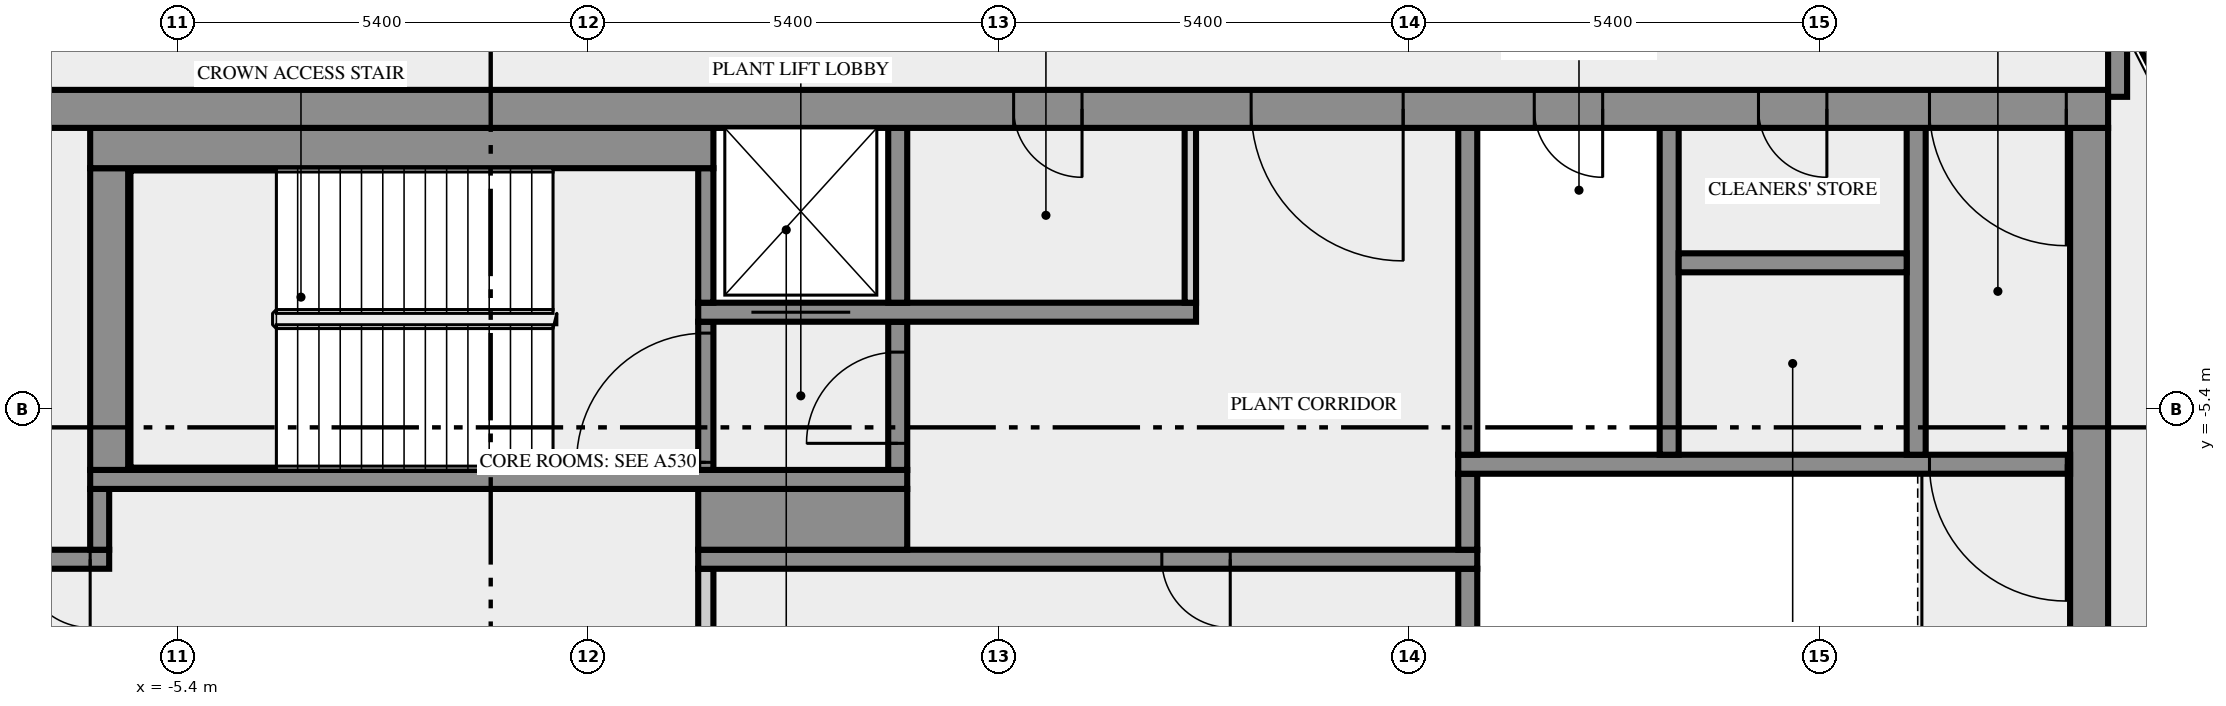
"""IFC4 building model, lengths in metres.
Left out: names, types, materials, properties, quantities, classifications, styles, units other than length and angle.
Written with IfcOpenShell. Run it as: python <this file> out.ifc"""

import sys

from ifc_helpers import new_model, si_unit, direction, frame, frame_2d, origin, place, context, subcontext, project, spatial, rectangle, extrude, element, fill, save


model = new_model("IFC4")
c1 = context("Model", 3, precision=1e-05, world=origin(), true_north=direction((0.0, 1.0)))
c2 = subcontext(c1, "Body", "Model", "MODEL_VIEW")
j1 = project(units=[si_unit("LENGTHUNIT", "METRE"), si_unit("PLANEANGLEUNIT", "RADIAN")], contexts=[c1])
p1 = place(None, origin())
s1 = spatial("IfcSite", under=j1, at=p1, CompositionType="ELEMENT")
p2 = place(p1, origin())
s2 = spatial("IfcBuilding", under=s1, at=p2, CompositionType="ELEMENT")
p3 = place(p2, frame((0.0, 0.0, 363.0)))
s3 = spatial("IfcBuildingStorey", under=s2, at=p3, CompositionType="ELEMENT", Elevation=363.0)
p4 = place(p3, frame((24.274, -7.992, 0.0), z_axis=(0.0, 0.0, 1.0), x_axis=(-0.453998845176, 0.891002271927, 0.0)))
e1 = element("IfcWall", 1, at=p4, inside=s3, PredefinedType="SOLIDWALL", context=c2, shape_type="SweptSolid", body=[
    extrude(rectangle(XDim=20.973, YDim=0.2, at=frame_2d((10.487, 0.0))), origin(), (0.0, 0.0, 1.0), 4.75),
])
p5 = place(p4, frame((0.81, 0.0, 1.0)))
e2 = element("IfcOpeningElement", 2, at=p5, cuts=e1, PredefinedType="OPENING", context=c2, shape_type="SweptSolid", body=[
    extrude(rectangle(XDim=3.0, YDim=2.8, at=frame_2d((1.5, 1.4))), frame((0.0, 0.11, 0.0), z_axis=(0.0, -1.0, 0.0), x_axis=(1.0, 0.0, 0.0)), (0.0, 0.0, 1.0), 0.22),
])
p6 = place(p4, frame((5.928, 0.0, 1.0)))
e3 = element("IfcOpeningElement", 3, at=p6, cuts=e1, PredefinedType="OPENING", context=c2, shape_type="SweptSolid", body=[
    extrude(rectangle(XDim=3.0, YDim=2.8, at=frame_2d((1.5, 1.4))), frame((0.0, 0.11, 0.0), z_axis=(0.0, -1.0, 0.0), x_axis=(1.0, 0.0, 0.0)), (0.0, 0.0, 1.0), 0.22),
])
p7 = place(p4, frame((11.544, 0.0, 1.0)))
e4 = element("IfcOpeningElement", 4, at=p7, cuts=e1, PredefinedType="OPENING", context=c2, shape_type="SweptSolid", body=[
    extrude(rectangle(XDim=3.0, YDim=2.8, at=frame_2d((1.5, 1.4))), frame((0.0, 0.11, 0.0), z_axis=(0.0, -1.0, 0.0), x_axis=(1.0, 0.0, 0.0)), (0.0, 0.0, 1.0), 0.22),
])
p8 = place(p4, frame((16.913, 0.0, 1.0)))
e5 = element("IfcOpeningElement", 5, at=p8, cuts=e1, PredefinedType="OPENING", context=c2, shape_type="SweptSolid", body=[
    extrude(rectangle(XDim=3.0, YDim=2.8, at=frame_2d((1.5, 1.4))), frame((0.0, 0.11, 0.0), z_axis=(0.0, -1.0, 0.0), x_axis=(1.0, 0.0, 0.0)), (0.0, 0.0, 1.0), 0.22),
])
p9 = place(p3, frame((1.55, -10.5, 0.0), z_axis=(0.0, 0.0, 1.0), x_axis=(0.0, 1.0, 0.0)))
e6 = element("IfcWall", 6, at=p9, inside=s3, PredefinedType="SOLIDWALL", context=c2, shape_type="SweptSolid", body=[
    extrude(rectangle(XDim=3.0, YDim=0.2, at=frame_2d((1.5, 0.0))), origin(), (0.0, 0.0, 1.0), 4.75),
])
p10 = place(p3, frame((11.575, -10.5, 0.0), z_axis=(0.0, 0.0, 1.0), x_axis=(0.0, 1.0, 0.0)))
e7 = element("IfcWall", 7, at=p10, inside=s3, PredefinedType="SHEAR", context=c2, shape_type="SweptSolid", body=[
    extrude(rectangle(XDim=3.0, YDim=0.25, at=frame_2d((1.5, 0.0))), origin(), (0.0, 0.0, 1.0), 4.75),
])
p11 = place(p3, frame((19.75, -10.5, 0.0), z_axis=(0.0, 0.0, 1.0), x_axis=(0.0, 1.0, 0.0)))
e8 = element("IfcWall", 8, at=p11, inside=s3, PredefinedType="SHEAR", context=c2, shape_type="SweptSolid", body=[
    extrude(rectangle(XDim=8.8, YDim=0.5, at=frame_2d((4.4, 0.0))), origin(), (0.0, 0.0, 1.0), 4.75),
])
p12 = place(p3, frame((-6.3, -7.375, 0.0), z_axis=(0.0, 0.0, 1.0), x_axis=(-1.0, 0.0, 0.0)))
e9 = element("IfcWall", 9, at=p12, inside=s3, PredefinedType="SHEAR", context=c2, shape_type="SweptSolid", body=[
    extrude(rectangle(XDim=5.15, YDim=0.25, at=frame_2d((2.575, 0.0))), origin(), (0.0, 0.0, 1.0), 4.75),
])
p13 = place(p12, frame((2.95, 0.0, 0.0)))
e10 = element("IfcOpeningElement", 10, at=p13, cuts=e9, PredefinedType="OPENING", context=c2, shape_type="SweptSolid", body=[
    extrude(rectangle(XDim=0.9, YDim=2.1, at=frame_2d((0.45, 1.05))), frame((0.0, 0.135, 0.0), z_axis=(0.0, -1.0, 0.0), x_axis=(1.0, 0.0, 0.0)), (0.0, 0.0, 1.0), 0.27),
])
p14 = place(p12, frame((0.25, 0.0, 0.0)))
e11 = element("IfcOpeningElement", 11, at=p14, cuts=e9, PredefinedType="OPENING", context=c2, shape_type="SweptSolid", body=[
    extrude(rectangle(XDim=0.9, YDim=2.1, at=frame_2d((0.45, 1.05))), frame((0.0, 0.135, 0.0), z_axis=(0.0, -1.0, 0.0), x_axis=(1.0, 0.0, 0.0)), (0.0, 0.0, 1.0), 0.27),
])
p15 = place(p3, frame((11.7, -7.375, 0.0), z_axis=(0.0, 0.0, 1.0), x_axis=(-1.0, 0.0, 0.0)))
e12 = element("IfcWall", 12, at=p15, inside=s3, PredefinedType="SHEAR", context=c2, shape_type="SweptSolid", body=[
    extrude(rectangle(XDim=10.25, YDim=0.25, at=frame_2d((5.125, 0.0))), origin(), (0.0, 0.0, 1.0), 4.75),
])
p16 = place(p15, frame((3.25, 0.0, 0.0)))
e13 = element("IfcOpeningElement", 13, at=p16, cuts=e12, PredefinedType="OPENING", context=c2, shape_type="SweptSolid", body=[
    extrude(rectangle(XDim=0.9, YDim=2.1, at=frame_2d((0.45, 1.05))), frame((0.0, 0.135, 0.0), z_axis=(0.0, -1.0, 0.0), x_axis=(1.0, 0.0, 0.0)), (0.0, 0.0, 1.0), 0.27),
])
p17 = place(p3, frame((-6.425, -7.25, 0.0), z_axis=(0.0, 0.0, 1.0), x_axis=(0.0, 1.0, 0.0)))
e14 = element("IfcWall", 14, at=p17, inside=s3, PredefinedType="SHEAR", context=c2, shape_type="SweptSolid", body=[
    extrude(rectangle(XDim=0.8, YDim=0.25, at=frame_2d((0.4, 0.0))), origin(), (0.0, 0.0, 1.0), 4.75),
])
p18 = place(p3, frame((1.45, -6.85, 0.0), z_axis=(0.0, 0.0, 1.0), x_axis=(1.0, 0.0, 0.0)))
e15 = element("IfcWall", 15, at=p18, inside=s3, PredefinedType="SHEAR", context=c2, shape_type="SweptSolid", body=[
    extrude(rectangle(XDim=2.75, YDim=0.8, at=frame_2d((1.375, 0.0))), origin(), (0.0, 0.0, 1.0), 4.75),
])
p19 = place(p3, frame((11.575, -7.25, 0.0), z_axis=(0.0, 0.0, 1.0), x_axis=(0.0, 1.0, 0.0)))
e16 = element("IfcWall", 16, at=p19, inside=s3, PredefinedType="SHEAR", context=c2, shape_type="SweptSolid", body=[
    extrude(rectangle(XDim=1.0, YDim=0.25, at=frame_2d((0.5, 0.0))), origin(), (0.0, 0.0, 1.0), 4.75),
])
p20 = place(p3, frame((-6.55, -6.325, 0.0), z_axis=(0.0, 0.0, 1.0), x_axis=(1.0, 0.0, 0.0)))
e17 = element("IfcWall", 17, at=p20, inside=s3, PredefinedType="SHEAR", context=c2, shape_type="SweptSolid", body=[
    extrude(rectangle(XDim=10.75, YDim=0.25, at=frame_2d((5.375, 0.0))), origin(), (0.0, 0.0, 1.0), 4.75),
])
p21 = place(p3, frame((19.5, -6.125, 0.0), z_axis=(0.0, 0.0, 1.0), x_axis=(-1.0, 0.0, 0.0)))
e18 = element("IfcWall", 18, at=p21, inside=s3, PredefinedType="SHEAR", context=c2, shape_type="SweptSolid", body=[
    extrude(rectangle(XDim=8.05, YDim=0.25, at=frame_2d((4.025, 0.0))), origin(), (0.0, 0.0, 1.0), 4.75),
])
p22 = place(p21, frame((0.05, 0.0, 0.0)))
e19 = element("IfcOpeningElement", 19, at=p22, cuts=e18, PredefinedType="OPENING", context=c2, shape_type="SweptSolid", body=[
    extrude(rectangle(XDim=1.8, YDim=2.1, at=frame_2d((0.9, 1.05))), frame((0.0, 0.135, 0.0), z_axis=(0.0, -1.0, 0.0), x_axis=(1.0, 0.0, 0.0)), (0.0, 0.0, 1.0), 0.27),
])
p23 = place(p3, frame((-6.3, -6.2, 0.0), z_axis=(0.0, 0.0, 1.0), x_axis=(0.0, 1.0, 0.0)))
e20 = element("IfcWall", 20, at=p23, inside=s3, PredefinedType="SHEAR", context=c2, shape_type="SweptSolid", body=[
    extrude(rectangle(XDim=3.97, YDim=0.5, at=frame_2d((1.985, 0.0))), origin(), (0.0, 0.0, 1.0), 4.75),
])
p24 = place(p3, frame((1.55, -6.2, 0.0), z_axis=(0.0, 0.0, 1.0), x_axis=(0.0, 1.0, 0.0)))
e21 = element("IfcWall", 21, at=p24, inside=s3, PredefinedType="SHEAR", context=c2, shape_type="SweptSolid", body=[
    extrude(rectangle(XDim=1.95, YDim=0.2, at=frame_2d((0.975, 0.0))), origin(), (0.0, 0.0, 1.0), 4.75),
])
p25 = place(p24, frame((0.1, 0.0, 0.0)))
e22 = element("IfcOpeningElement", 22, at=p25, cuts=e21, PredefinedType="OPENING", context=c2, shape_type="SweptSolid", body=[
    extrude(rectangle(XDim=1.7, YDim=2.1, at=frame_2d((0.85, 1.05))), frame((0.0, 0.11, 0.0), z_axis=(0.0, -1.0, 0.0), x_axis=(1.0, 0.0, 0.0)), (0.0, 0.0, 1.0), 0.22),
])
p26 = place(p3, frame((4.075, -6.2, 0.0), z_axis=(0.0, 0.0, 1.0), x_axis=(0.0, 1.0, 0.0)))
e23 = element("IfcWall", 23, at=p26, inside=s3, PredefinedType="SHEAR", context=c2, shape_type="SweptSolid", body=[
    extrude(rectangle(XDim=1.95, YDim=0.25, at=frame_2d((0.975, 0.0))), origin(), (0.0, 0.0, 1.0), 4.75),
])
p27 = place(p26, frame((0.35, 0.0, 0.0)))
e24 = element("IfcOpeningElement", 24, at=p27, cuts=e23, PredefinedType="OPENING", context=c2, shape_type="SweptSolid", body=[
    extrude(rectangle(XDim=1.2, YDim=2.1, at=frame_2d((0.6, 1.05))), frame((0.0, 0.135, 0.0), z_axis=(0.0, -1.0, 0.0), x_axis=(1.0, 0.0, 0.0)), (0.0, 0.0, 1.0), 0.27),
])
for number, where, z_axis, x_axis in (
    (25, (11.575, -6.0, 0.0), (0.0, 0.0, 1.0), (0.0, 1.0, 0.0)),
    (26, (14.225, -6.0, 0.0), (0.0, 0.0, 1.0), (0.0, 1.0, 0.0)),
    (27, (17.475, -6.0, 0.0), (0.0, 0.0, 1.0), (0.0, 1.0, 0.0)),
):
    element("IfcWall", number, at=place(p3, frame(where, z_axis=z_axis, x_axis=x_axis)), inside=s3, PredefinedType="SHEAR", context=c2, shape_type="SweptSolid", body=[
        extrude(rectangle(XDim=4.3, YDim=0.25, at=frame_2d((2.15, 0.0))), origin(), (0.0, 0.0, 1.0), 4.75),
    ])
p28 = place(p3, frame((1.45, -4.125, 0.0), z_axis=(0.0, 0.0, 1.0), x_axis=(1.0, 0.0, 0.0)))
e28 = element("IfcWall", 28, at=p28, inside=s3, PredefinedType="SHEAR", context=c2, shape_type="SweptSolid", body=[
    extrude(rectangle(XDim=6.55, YDim=0.25, at=frame_2d((3.275, 0.0))), origin(), (0.0, 0.0, 1.0), 4.75),
])
p29 = place(p28, frame((0.7, 0.0, 0.0)))
e29 = element("IfcOpeningElement", 29, at=p29, cuts=e28, PredefinedType="OPENING", context=c2, shape_type="SweptSolid", body=[
    extrude(rectangle(XDim=1.3, YDim=2.1, at=frame_2d((0.65, 1.05))), frame((0.0, 0.135, 0.0), z_axis=(0.0, -1.0, 0.0), x_axis=(1.0, 0.0, 0.0)), (0.0, 0.0, 1.0), 0.27),
])
p30 = place(p3, frame((1.55, -4.0, 0.0), z_axis=(0.0, 0.0, 1.0), x_axis=(0.0, 1.0, 0.0)))
e30 = element("IfcWall", 30, at=p30, inside=s3, PredefinedType="SHEAR", context=c2, shape_type="SweptSolid", body=[
    extrude(rectangle(XDim=1.77, YDim=0.2, at=frame_2d((0.885, 0.0))), origin(), (0.0, 0.0, 1.0), 4.75),
])
p31 = place(p3, frame((4.075, -4.0, 0.0), z_axis=(0.0, 0.0, 1.0), x_axis=(0.0, 1.0, 0.0)))
e31 = element("IfcWall", 31, at=p31, inside=s3, PredefinedType="SHEAR", context=c2, shape_type="SweptSolid", body=[
    extrude(rectangle(XDim=2.3, YDim=0.25, at=frame_2d((1.15, 0.0))), origin(), (0.0, 0.0, 1.0), 4.75),
])
p32 = place(p3, frame((7.925, -4.0, 0.0), z_axis=(0.0, 0.0, 1.0), x_axis=(0.0, 1.0, 0.0)))
e32 = element("IfcWall", 32, at=p32, inside=s3, PredefinedType="PARTITIONING", context=c2, shape_type="SweptSolid", body=[
    extrude(rectangle(XDim=2.3, YDim=0.15, at=frame_2d((1.15, 0.0))), origin(), (0.0, 0.0, 1.0), 4.75),
])
p33 = place(p3, frame((14.35, -3.475, 0.0), z_axis=(0.0, 0.0, 1.0), x_axis=(1.0, 0.0, 0.0)))
e33 = element("IfcWall", 33, at=p33, inside=s3, PredefinedType="SHEAR", context=c2, shape_type="SweptSolid", body=[
    extrude(rectangle(XDim=3.0, YDim=0.25, at=frame_2d((1.5, 0.0))), origin(), (0.0, 0.0, 1.0), 4.75),
])
p34 = place(p3, frame((-6.55, -1.965, 0.0), z_axis=(0.0, 0.0, 1.0), x_axis=(1.0, 0.0, 0.0)))
e34 = element("IfcWall", 34, at=p34, inside=s3, PredefinedType="SHEAR", context=c2, shape_type="SweptSolid", body=[
    extrude(rectangle(XDim=8.2, YDim=0.53, at=frame_2d((4.1, 0.0))), origin(), (0.0, 0.0, 1.0), 4.75),
])
p35 = place(p3, frame((20.0, -1.45, 0.0), z_axis=(0.0, 0.0, 1.0), x_axis=(-1.0, 0.0, 0.0)))
e35 = element("IfcWall", 35, at=p35, inside=s3, PredefinedType="SHEAR", context=c2, shape_type="SweptSolid", body=[
    extrude(rectangle(XDim=40.0, YDim=0.5, at=frame_2d((20.0, 0.0))), origin(), (0.0, 0.0, 1.0), 4.75),
])
p36 = place(p35, frame((37.65, 0.0, 0.0)))
e36 = element("IfcOpeningElement", 36, at=p36, cuts=e35, PredefinedType="OPENING", context=c2, shape_type="SweptSolid", body=[
    extrude(rectangle(XDim=1.8, YDim=2.1, at=frame_2d((0.9, 1.05))), frame((0.0, 0.26, 0.0), z_axis=(0.0, -1.0, 0.0), x_axis=(1.0, 0.0, 0.0)), (0.0, 0.0, 1.0), 0.52),
])
p37 = place(p35, frame((36.238, 0.0, 0.0)))
e37 = element("IfcOpeningElement", 37, at=p37, cuts=e35, PredefinedType="OPENING", context=c2, shape_type="SweptSolid", body=[
    extrude(rectangle(XDim=0.8, YDim=2.1, at=frame_2d((0.4, 1.05))), frame((0.0, 0.26, 0.0), z_axis=(0.0, -1.0, 0.0), x_axis=(1.0, 0.0, 0.0)), (0.0, 0.0, 1.0), 0.52),
])
p38 = place(p35, frame((34.663, 0.0, 0.0)))
e38 = element("IfcOpeningElement", 38, at=p38, cuts=e35, PredefinedType="OPENING", context=c2, shape_type="SweptSolid", body=[
    extrude(rectangle(XDim=0.8, YDim=2.1, at=frame_2d((0.4, 1.05))), frame((0.0, 0.26, 0.0), z_axis=(0.0, -1.0, 0.0), x_axis=(1.0, 0.0, 0.0)), (0.0, 0.0, 1.0), 0.52),
])
p39 = place(p35, frame((32.45, 0.0, 0.0)))
e39 = element("IfcOpeningElement", 39, at=p39, cuts=e35, PredefinedType="OPENING", context=c2, shape_type="SweptSolid", body=[
    extrude(rectangle(XDim=0.9, YDim=2.1, at=frame_2d((0.45, 1.05))), frame((0.0, 0.26, 0.0), z_axis=(0.0, -1.0, 0.0), x_axis=(1.0, 0.0, 0.0)), (0.0, 0.0, 1.0), 0.52),
])
p40 = place(p35, frame((30.25, 0.0, 0.0)))
e40 = element("IfcOpeningElement", 40, at=p40, cuts=e35, PredefinedType="OPENING", context=c2, shape_type="SweptSolid", body=[
    extrude(rectangle(XDim=0.9, YDim=2.1, at=frame_2d((0.45, 1.05))), frame((0.0, 0.26, 0.0), z_axis=(0.0, -1.0, 0.0), x_axis=(1.0, 0.0, 0.0)), (0.0, 0.0, 1.0), 0.52),
])
p41 = place(p35, frame((27.1, 0.0, 0.0)))
e41 = element("IfcOpeningElement", 41, at=p41, cuts=e35, PredefinedType="OPENING", context=c2, shape_type="SweptSolid", body=[
    extrude(rectangle(XDim=1.8, YDim=2.1, at=frame_2d((0.9, 1.05))), frame((0.0, 0.26, 0.0), z_axis=(0.0, -1.0, 0.0), x_axis=(1.0, 0.0, 0.0)), (0.0, 0.0, 1.0), 0.52),
])
p42 = place(p35, frame((13.5, 0.0, 0.0)))
e42 = element("IfcOpeningElement", 42, at=p42, cuts=e35, PredefinedType="OPENING", context=c2, shape_type="SweptSolid", body=[
    extrude(rectangle(XDim=0.9, YDim=2.1, at=frame_2d((0.45, 1.05))), frame((0.0, 0.26, 0.0), z_axis=(0.0, -1.0, 0.0), x_axis=(1.0, 0.0, 0.0)), (0.0, 0.0, 1.0), 0.52),
])
p43 = place(p35, frame((9.275, 0.0, 0.0)))
e43 = element("IfcOpeningElement", 43, at=p43, cuts=e35, PredefinedType="OPENING", context=c2, shape_type="SweptSolid", body=[
    extrude(rectangle(XDim=2.0, YDim=2.1, at=frame_2d((1.0, 1.05))), frame((0.0, 0.26, 0.0), z_axis=(0.0, -1.0, 0.0), x_axis=(1.0, 0.0, 0.0)), (0.0, 0.0, 1.0), 0.52),
])
p44 = place(p35, frame((6.65, 0.0, 0.0)))
e44 = element("IfcOpeningElement", 44, at=p44, cuts=e35, PredefinedType="OPENING", context=c2, shape_type="SweptSolid", body=[
    extrude(rectangle(XDim=0.9, YDim=2.1, at=frame_2d((0.45, 1.05))), frame((0.0, 0.26, 0.0), z_axis=(0.0, -1.0, 0.0), x_axis=(1.0, 0.0, 0.0)), (0.0, 0.0, 1.0), 0.52),
])
p45 = place(p35, frame((3.7, 0.0, 0.0)))
e45 = element("IfcOpeningElement", 45, at=p45, cuts=e35, PredefinedType="OPENING", context=c2, shape_type="SweptSolid", body=[
    extrude(rectangle(XDim=0.9, YDim=2.1, at=frame_2d((0.45, 1.05))), frame((0.0, 0.26, 0.0), z_axis=(0.0, -1.0, 0.0), x_axis=(1.0, 0.0, 0.0)), (0.0, 0.0, 1.0), 0.52),
])
p46 = place(p35, frame((0.55, 0.0, 0.0)))
e46 = element("IfcOpeningElement", 46, at=p46, cuts=e35, PredefinedType="OPENING", context=c2, shape_type="SweptSolid", body=[
    extrude(rectangle(XDim=1.8, YDim=2.1, at=frame_2d((0.9, 1.05))), frame((0.0, 0.26, 0.0), z_axis=(0.0, -1.0, 0.0), x_axis=(1.0, 0.0, 0.0)), (0.0, 0.0, 1.0), 0.52),
])
p47 = place(p3, frame((20.125, -0.36, 0.0), z_axis=(0.0, 0.0, 1.0), x_axis=(0.0, -1.0, 0.0)))
e47 = element("IfcWall", 47, at=p47, inside=s3, PredefinedType="SOLIDWALL", context=c2, shape_type="SweptSolid", body=[
    extrude(rectangle(XDim=0.931, YDim=0.25, at=frame_2d((0.466, 0.0))), origin(), (0.0, 0.0, 1.0), 4.05),
])
p48 = place(p6, origin())
e48 = element("IfcWindow", 48, at=p48, inside=s3, PartitioningType="SINGLE_PANEL", PredefinedType="WINDOW", context=c2, shape_type="SweptSolid", body=[
    extrude(rectangle(XDim=3.0, YDim=2.8, at=frame_2d((1.5, 1.4))), frame((0.0, 0.03, 0.0), z_axis=(0.0, -1.0, 0.0), x_axis=(1.0, 0.0, 0.0)), (0.0, 0.0, 1.0), 0.06),
])
fill(e3, e48)
p49 = place(p14, origin())
e49 = element("IfcDoor", 49, at=p49, inside=s3, OperationType="SINGLE_SWING_LEFT", PredefinedType="DOOR", context=c2, shape_type="SweptSolid", body=[
    extrude(rectangle(XDim=0.9, YDim=2.1, at=frame_2d((0.45, 1.05))), frame((0.0, 0.025, 0.0), z_axis=(0.0, -1.0, 0.0), x_axis=(1.0, 0.0, 0.0)), (0.0, 0.0, 1.0), 0.05),
])
fill(e11, e49)
p50 = place(p16, origin())
e50 = element("IfcDoor", 50, at=p50, inside=s3, OperationType="SINGLE_SWING_LEFT", PredefinedType="DOOR", context=c2, shape_type="SweptSolid", body=[
    extrude(rectangle(XDim=0.9, YDim=2.1, at=frame_2d((0.45, 1.05))), frame((0.0, 0.025, 0.0), z_axis=(0.0, -1.0, 0.0), x_axis=(1.0, 0.0, 0.0)), (0.0, 0.0, 1.0), 0.05),
])
fill(e13, e50)
p51 = place(p22, origin())
e51 = element("IfcDoor", 51, at=p51, inside=s3, OperationType="DOUBLE_DOOR_SINGLE_SWING", PredefinedType="DOOR", context=c2, shape_type="SweptSolid", body=[
    extrude(rectangle(XDim=1.8, YDim=2.1, at=frame_2d((0.9, 1.05))), frame((0.0, 0.025, 0.0), z_axis=(0.0, -1.0, 0.0), x_axis=(1.0, 0.0, 0.0)), (0.0, 0.0, 1.0), 0.05),
])
fill(e19, e51)
p52 = place(p25, origin())
e52 = element("IfcDoor", 52, at=p52, inside=s3, OperationType="DOUBLE_DOOR_SINGLE_SWING", PredefinedType="DOOR", context=c2, shape_type="SweptSolid", body=[
    extrude(rectangle(XDim=1.7, YDim=2.1, at=frame_2d((0.85, 1.05))), frame((0.0, 0.025, 0.0), z_axis=(0.0, -1.0, 0.0), x_axis=(1.0, 0.0, 0.0)), (0.0, 0.0, 1.0), 0.05),
])
fill(e22, e52)
p53 = place(p27, origin())
e53 = element("IfcDoor", 53, at=p53, inside=s3, OperationType="SINGLE_SWING_LEFT", PredefinedType="DOOR", context=c2, shape_type="SweptSolid", body=[
    extrude(rectangle(XDim=1.2, YDim=2.1, at=frame_2d((0.6, 1.05))), frame((0.0, 0.025, 0.0), z_axis=(0.0, -1.0, 0.0), x_axis=(1.0, 0.0, 0.0)), (0.0, 0.0, 1.0), 0.05),
])
fill(e24, e53)
p54 = place(p29, origin())
e54 = element("IfcDoor", 54, at=p54, inside=s3, OperationType="DOUBLE_DOOR_SLIDING", PredefinedType="DOOR", context=c2, shape_type="SweptSolid", body=[
    extrude(rectangle(XDim=1.3, YDim=2.1, at=frame_2d((0.65, 1.05))), frame((0.0, 0.025, 0.0), z_axis=(0.0, -1.0, 0.0), x_axis=(1.0, 0.0, 0.0)), (0.0, 0.0, 1.0), 0.05),
])
fill(e29, e54)
p55 = place(p42, origin())
e55 = element("IfcDoor", 55, at=p55, inside=s3, OperationType="SINGLE_SWING_LEFT", PredefinedType="DOOR", context=c2, shape_type="SweptSolid", body=[
    extrude(rectangle(XDim=0.9, YDim=2.1, at=frame_2d((0.45, 1.05))), frame((0.0, 0.025, 0.0), z_axis=(0.0, -1.0, 0.0), x_axis=(1.0, 0.0, 0.0)), (0.0, 0.0, 1.0), 0.05),
])
fill(e42, e55)
p56 = place(p43, origin())
e56 = element("IfcDoor", 56, at=p56, inside=s3, OperationType="DOUBLE_DOOR_SINGLE_SWING", PredefinedType="DOOR", context=c2, shape_type="SweptSolid", body=[
    extrude(rectangle(XDim=2.0, YDim=2.1, at=frame_2d((1.0, 1.05))), frame((0.0, 0.025, 0.0), z_axis=(0.0, -1.0, 0.0), x_axis=(1.0, 0.0, 0.0)), (0.0, 0.0, 1.0), 0.05),
])
fill(e43, e56)
p57 = place(p44, origin())
e57 = element("IfcDoor", 57, at=p57, inside=s3, OperationType="SINGLE_SWING_LEFT", PredefinedType="DOOR", context=c2, shape_type="SweptSolid", body=[
    extrude(rectangle(XDim=0.9, YDim=2.1, at=frame_2d((0.45, 1.05))), frame((0.0, 0.025, 0.0), z_axis=(0.0, -1.0, 0.0), x_axis=(1.0, 0.0, 0.0)), (0.0, 0.0, 1.0), 0.05),
])
fill(e44, e57)
p58 = place(p45, origin())
e58 = element("IfcDoor", 58, at=p58, inside=s3, OperationType="SINGLE_SWING_LEFT", PredefinedType="DOOR", context=c2, shape_type="SweptSolid", body=[
    extrude(rectangle(XDim=0.9, YDim=2.1, at=frame_2d((0.45, 1.05))), frame((0.0, 0.025, 0.0), z_axis=(0.0, -1.0, 0.0), x_axis=(1.0, 0.0, 0.0)), (0.0, 0.0, 1.0), 0.05),
])
fill(e45, e58)
p59 = place(p46, origin())
e59 = element("IfcDoor", 59, at=p59, inside=s3, OperationType="DOUBLE_DOOR_SINGLE_SWING", PredefinedType="DOOR", context=c2, shape_type="SweptSolid", body=[
    extrude(rectangle(XDim=1.8, YDim=2.1, at=frame_2d((0.9, 1.05))), frame((0.0, 0.025, 0.0), z_axis=(0.0, -1.0, 0.0), x_axis=(1.0, 0.0, 0.0)), (0.0, 0.0, 1.0), 0.05),
])
fill(e46, e59)
save(model, sys.argv[1])
